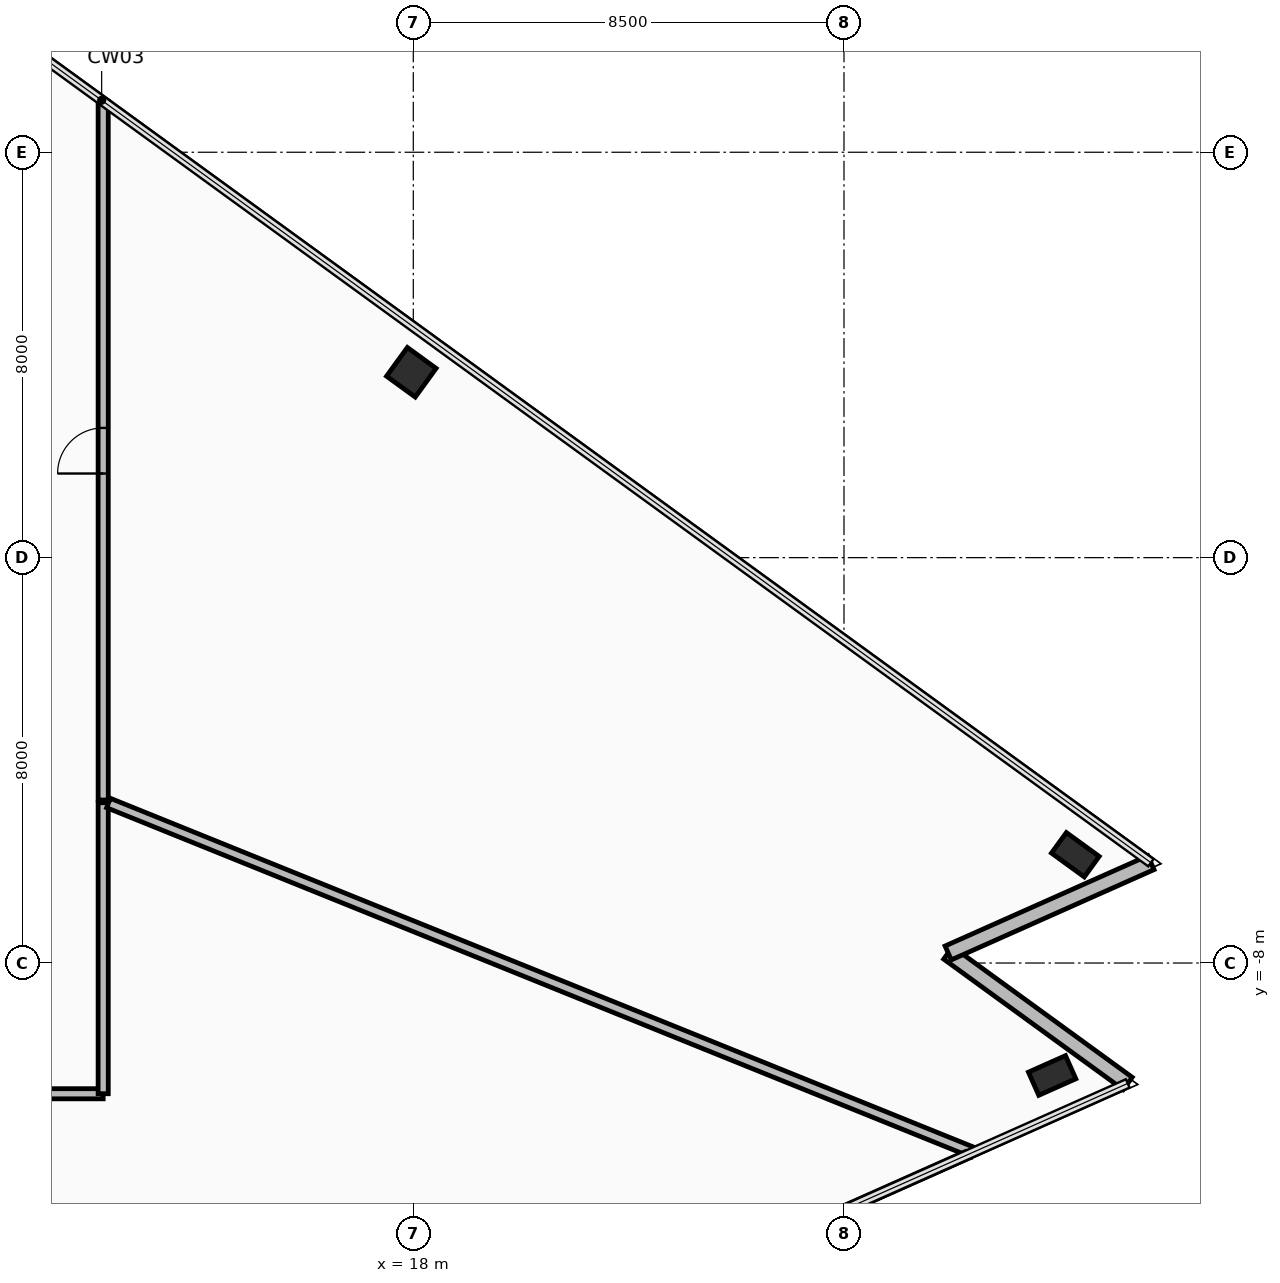
"""IFC4 building model, lengths in metres.
Left out: names, types, materials, properties, quantities, classifications, styles, units other than length and angle.
Written with IfcOpenShell. Run it as: python <this file> out.ifc"""

import sys

from ifc_helpers import new_model, si_unit, direction, frame, frame_2d, origin, origin_2d, place, context, subcontext, project, spatial, rectangle, hollow_rectangle, extrude, element, fill, save


model = new_model("IFC4")
c1 = context("Model", 3, precision=1e-05, world=origin(), true_north=direction((0.0, 1.0)))
c2 = subcontext(c1, "Body", "Model", "MODEL_VIEW")
j1 = project(units=[si_unit("LENGTHUNIT", "METRE"), si_unit("PLANEANGLEUNIT", "RADIAN")], contexts=[c1])
p1 = place(None, origin())
s1 = spatial("IfcSite", under=j1, at=p1, CompositionType="ELEMENT")
p2 = place(p1, origin())
s2 = spatial("IfcBuilding", under=s1, at=p2, CompositionType="ELEMENT")
p3 = place(p2, frame((0.0, 0.0, 134.05)))
s3 = spatial("IfcBuildingStorey", under=s2, at=p3, CompositionType="ELEMENT", Elevation=134.05)
for number, where, z_axis, x_axis in (
    (1, (30.608, -10.219, 0.0), (0.0, 0.0, 1.0), (0.914, 0.407, 0.0)),
    (2, (31.066, -5.863, 0.0), (0.0, 0.0, 1.0), (-0.809, 0.588, 0.0)),
):
    element("IfcColumn", number, at=place(p3, frame(where, z_axis=z_axis, x_axis=x_axis)), inside=s3, PredefinedType="COLUMN", context=c2, shape_type="SweptSolid", body=[
        extrude(hollow_rectangle(XDim=0.5, YDim=0.8, WallThickness=0.04, at=origin_2d()), origin(), (0.0, 0.0, 1.0), 4.75),
    ])
p4 = place(p3, frame((17.961, 3.658, 0.0), z_axis=(0.0, 0.0, 1.0), x_axis=(-0.809016994375, 0.587785252292, 0.0)))
e3 = element("IfcColumn", 3, at=p4, inside=s3, PredefinedType="COLUMN", context=c2, shape_type="SweptSolid", body=[
    extrude(hollow_rectangle(XDim=0.7, YDim=0.7, WallThickness=0.04, at=origin_2d()), origin(), (0.0, 0.0, 1.0), 4.75),
])
for number, where, z_axis, x_axis in (
    (4, (32.1, -10.376, 0.0), (0.0, 0.0, 1.0), (-0.809, 0.588, 0.0)),
    (5, (28.556, -7.802, 0.0), (0.0, 0.0, 1.0), (0.914, 0.407, 0.0)),
):
    element("IfcWall", number, at=place(p3, frame(where, z_axis=z_axis, x_axis=x_axis)), inside=s3, PredefinedType="STANDARD", context=c2, shape_type="SweptSolid", body=[
        extrude(rectangle(XDim=4.38, YDim=0.3, at=frame_2d((2.19, 0.0))), origin(), (0.0, 0.0, 1.0), 2.255),
    ])
p5 = place(p3, frame((-4.258, -10.58, 0.0), z_axis=(0.0, 0.0, 1.0), x_axis=(1.0, 0.0, 0.0)))
e6 = element("IfcWall", 6, at=p5, inside=s3, PredefinedType="PARTITIONING", context=c2, shape_type="SweptSolid", body=[
    extrude(rectangle(XDim=16.137, YDim=0.2, at=frame_2d((8.069, 0.0))), origin(), (0.0, 0.0, 1.0), 2.355),
])
p6 = place(p5, frame((7.644, 0.0, 0.0)))
e7 = element("IfcOpeningElement", 7, at=p6, cuts=e6, PredefinedType="OPENING", context=c2, shape_type="SweptSolid", body=[
    extrude(rectangle(XDim=0.85, YDim=2.1, at=frame_2d((0.425, 1.05))), frame((0.0, 0.11, 0.0), z_axis=(0.0, -1.0, 0.0), x_axis=(1.0, 0.0, 0.0)), (0.0, 0.0, 1.0), 0.22),
])
p7 = place(p3, frame((11.88, -10.579, 0.0), z_axis=(0.0, 0.0, 1.0), x_axis=(0.0, 1.0, 0.0)))
e8 = element("IfcWall", 8, at=p7, inside=s3, PredefinedType="PARTITIONING", context=c2, shape_type="SweptSolid", body=[
    extrude(rectangle(XDim=5.742, YDim=0.2, at=frame_2d((2.871, 0.0))), origin(), (0.0, 0.0, 1.0), 2.355),
])
p8 = place(p3, frame((11.985, -4.842, 0.0), z_axis=(0.0, 0.0, 1.0), x_axis=(0.927179986841, -0.37461616623, 0.0)))
e9 = element("IfcWall", 9, at=p8, inside=s3, PredefinedType="PARTITIONING", context=c2, shape_type="SweptSolid", body=[
    extrude(rectangle(XDim=18.401, YDim=0.2, at=frame_2d((9.2, 0.0))), origin(), (0.0, 0.0, 1.0), 2.255),
])
p9 = place(p3, frame((28.913, -11.795, 0.0), z_axis=(0.0, 0.0, 1.0), x_axis=(-0.913545956469, -0.406735522692, 0.0)))
e10 = element("IfcWall", 10, at=p9, inside=s3, PredefinedType="PARTITIONING", context=c2, shape_type="SweptSolid", body=[
    extrude(rectangle(XDim=44.801, YDim=0.15, at=frame_2d((22.4, 0.0))), origin(), (0.0, 0.0, 1.0), 2.355),
])
p10 = place(p3, frame((11.88, -4.783, 0.0), z_axis=(0.0, 0.0, 1.0), x_axis=(0.0, 1.0, 0.0)))
e11 = element("IfcWall", 11, at=p10, inside=s3, PredefinedType="PARTITIONING", context=c2, shape_type="SweptSolid", body=[
    extrude(rectangle(XDim=13.786, YDim=0.2, at=frame_2d((6.893, 0.0))), origin(), (0.0, 0.0, 1.0), 2.255),
])
p11 = place(p10, frame((6.443, 0.0, 0.0)))
e12 = element("IfcOpeningElement", 12, at=p11, cuts=e11, PredefinedType="OPENING", context=c2, shape_type="SweptSolid", body=[
    extrude(rectangle(XDim=0.9, YDim=2.1, at=frame_2d((0.45, 1.05))), frame((0.0, 0.11, 0.0), z_axis=(0.0, -1.0, 0.0), x_axis=(1.0, 0.0, 0.0)), (0.0, 0.0, 1.0), 0.22),
])
p12 = place(p11, origin())
e13 = element("IfcDoor", 13, at=p12, inside=s3, OperationType="SINGLE_SWING_LEFT", PredefinedType="DOOR", context=c2, shape_type="SweptSolid", body=[
    extrude(rectangle(XDim=0.9, YDim=2.1, at=frame_2d((0.45, 1.05))), frame((0.0, 0.025, 0.0), z_axis=(0.0, -1.0, 0.0), x_axis=(1.0, 0.0, 0.0)), (0.0, 0.0, 1.0), 0.05),
])
fill(e12, e13)
save(model, sys.argv[1])
